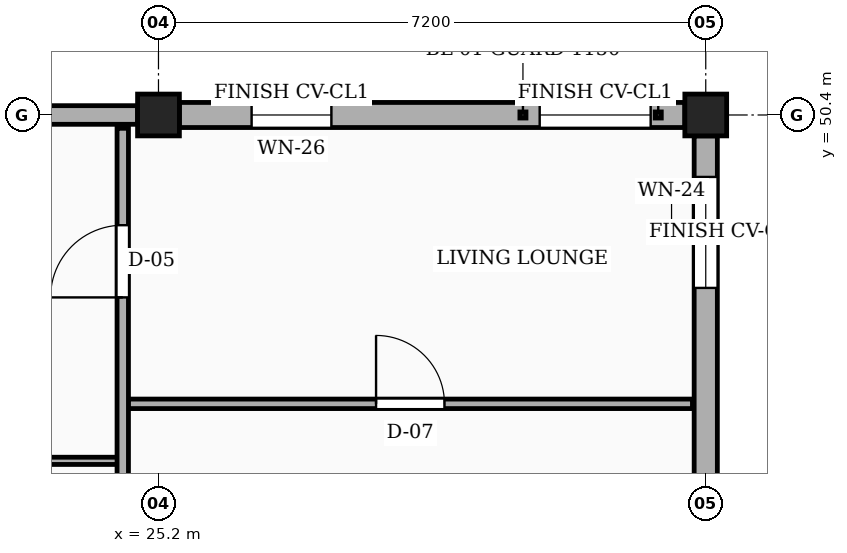
"""IFC4 building model, lengths in metres.
Left out: names, types, materials, properties, quantities, classifications, styles, units other than length and angle.
Written with IfcOpenShell. Run it as: python <this file> out.ifc"""

import sys

from ifc_helpers import new_model, si_unit, direction, frame, frame_2d, origin, origin_2d, place, context, subcontext, project, spatial, rectangle, extrude, element, fill, save


model = new_model("IFC4")
c1 = context("Model", 3, precision=1e-05, world=origin(), true_north=direction((0.0, 1.0)))
c2 = subcontext(c1, "Body", "Model", "MODEL_VIEW")
j1 = project(units=[si_unit("LENGTHUNIT", "METRE"), si_unit("PLANEANGLEUNIT", "RADIAN")], contexts=[c1])
p1 = place(None, origin())
s1 = spatial("IfcSite", under=j1, at=p1, CompositionType="ELEMENT")
p2 = place(p1, origin())
s2 = spatial("IfcBuilding", under=s1, at=p2, CompositionType="ELEMENT")
p3 = place(p2, frame((0.0, 0.0, 13.95)))
s3 = spatial("IfcBuildingStorey", under=s2, at=p3, CompositionType="ELEMENT", Elevation=13.95)
for number, where, z_axis, x_axis in (
    (1, (25.2, 50.4, 0.0), (0.0, 0.0, 1.0), (1.0, 0.0, 0.0)),
    (2, (32.4, 50.4, 0.0), (0.0, 0.0, 1.0), (1.0, 0.0, 0.0)),
):
    element("IfcColumn", number, at=place(p3, frame(where, z_axis=z_axis, x_axis=x_axis)), inside=s3, PredefinedType="COLUMN", context=c2, shape_type="SweptSolid", body=[
        extrude(rectangle(XDim=0.55, YDim=0.55, at=origin_2d()), origin(), (0.0, 0.0, 1.0), 3.15),
    ])
p4 = place(p3, frame((32.4, 43.475, 0.0), z_axis=(0.0, 0.0, 1.0), x_axis=(0.0, 1.0, 0.0)))
e3 = element("IfcWall", 3, at=p4, inside=s3, PredefinedType="SOLIDWALL", context=c2, shape_type="SweptSolid", body=[
    extrude(rectangle(XDim=6.65, YDim=0.305, at=frame_2d((3.325, 0.0))), origin(), (0.0, 0.0, 1.0), 2.44),
])
p5 = place(p4, frame((0.45, 0.0, 0.78)))
e4 = element("IfcOpeningElement", 4, at=p5, cuts=e3, PredefinedType="OPENING", context=c2, shape_type="SweptSolid", body=[
    extrude(rectangle(XDim=1.3, YDim=1.36, at=frame_2d((0.65, 0.68))), frame((0.0, 0.163, 0.0), z_axis=(0.0, -1.0, 0.0), x_axis=(1.0, 0.0, 0.0)), (0.0, 0.0, 1.0), 0.325),
])
p6 = place(p4, frame((4.65, 0.0, 0.78)))
e5 = element("IfcOpeningElement", 5, at=p6, cuts=e3, PredefinedType="OPENING", context=c2, shape_type="SweptSolid", body=[
    extrude(rectangle(XDim=1.46, YDim=1.36, at=frame_2d((0.73, 0.68))), frame((0.0, 0.163, 0.0), z_axis=(0.0, -1.0, 0.0), x_axis=(1.0, 0.0, 0.0)), (0.0, 0.0, 1.0), 0.325),
])
p7 = place(p3, frame((32.125, 50.4, 0.0), z_axis=(0.0, 0.0, 1.0), x_axis=(-1.0, 0.0, 0.0)))
e6 = element("IfcWall", 6, at=p7, inside=s3, PredefinedType="SOLIDWALL", context=c2, shape_type="SweptSolid", body=[
    extrude(rectangle(XDim=6.65, YDim=0.33, at=frame_2d((3.325, 0.0))), origin(), (0.0, 0.0, 1.0), 2.44),
])
p8 = place(p7, frame((0.45, 0.0, 0.78)))
e7 = element("IfcOpeningElement", 7, at=p8, cuts=e6, PredefinedType="OPENING", context=c2, shape_type="SweptSolid", body=[
    extrude(rectangle(XDim=1.46, YDim=1.36, at=frame_2d((0.73, 0.68))), frame((0.0, 0.175, 0.0), z_axis=(0.0, -1.0, 0.0), x_axis=(1.0, 0.0, 0.0)), (0.0, 0.0, 1.0), 0.35),
])
p9 = place(p7, frame((4.65, 0.0, 0.78)))
e8 = element("IfcOpeningElement", 8, at=p9, cuts=e6, PredefinedType="OPENING", context=c2, shape_type="SweptSolid", body=[
    extrude(rectangle(XDim=1.05, YDim=1.44, at=frame_2d((0.525, 0.72))), frame((0.0, 0.175, 0.0), z_axis=(0.0, -1.0, 0.0), x_axis=(1.0, 0.0, 0.0)), (0.0, 0.0, 1.0), 0.35),
])
p10 = place(p3, frame((24.925, 50.4, 0.0), z_axis=(0.0, 0.0, 1.0), x_axis=(-1.0, 0.0, 0.0)))
e9 = element("IfcWall", 9, at=p10, inside=s3, PredefinedType="SOLIDWALL", context=c2, shape_type="SweptSolid", body=[
    extrude(rectangle(XDim=6.65, YDim=0.245, at=frame_2d((3.325, 0.0))), origin(), (0.0, 0.0, 1.0), 2.44),
])
p11 = place(p10, frame((1.985, 0.0, 0.78)))
e10 = element("IfcOpeningElement", 10, at=p11, cuts=e9, PredefinedType="OPENING", context=c2, shape_type="SweptSolid", body=[
    extrude(rectangle(XDim=1.05, YDim=1.44, at=frame_2d((0.525, 0.72))), frame((0.0, 0.133, 0.0), z_axis=(0.0, -1.0, 0.0), x_axis=(1.0, 0.0, 0.0)), (0.0, 0.0, 1.0), 0.265),
])
p12 = place(p10, frame((5.147, 0.0, 0.78)))
e11 = element("IfcOpeningElement", 11, at=p12, cuts=e9, PredefinedType="OPENING", context=c2, shape_type="SweptSolid", body=[
    extrude(rectangle(XDim=1.04, YDim=1.26, at=frame_2d((0.52, 0.63))), frame((0.0, 0.133, 0.0), z_axis=(0.0, -1.0, 0.0), x_axis=(1.0, 0.0, 0.0)), (0.0, 0.0, 1.0), 0.265),
])
p13 = place(p3, frame((24.8, 46.6, 0.0), z_axis=(0.0, 0.0, 1.0), x_axis=(1.0, 0.0, 0.0)))
e12 = element("IfcWall", 12, at=p13, inside=s3, PredefinedType="PARTITIONING", context=c2, shape_type="SweptSolid", body=[
    extrude(rectangle(XDim=7.425, YDim=0.125, at=frame_2d((3.712, 0.0))), origin(), (0.0, 0.0, 1.0), 2.305),
])
p14 = place(p13, frame((3.262, 0.0, 0.0)))
e13 = element("IfcOpeningElement", 13, at=p14, cuts=e12, PredefinedType="OPENING", context=c2, shape_type="SweptSolid", body=[
    extrude(rectangle(XDim=0.9, YDim=2.1, at=frame_2d((0.45, 1.05))), frame((0.0, 0.073, 0.0), z_axis=(0.0, -1.0, 0.0), x_axis=(1.0, 0.0, 0.0)), (0.0, 0.0, 1.0), 0.145),
])
p15 = place(p3, frame((20.19, 45.85, 0.0), z_axis=(0.0, 0.0, 1.0), x_axis=(1.0, 0.0, 0.0)))
e14 = element("IfcWall", 14, at=p15, inside=s3, PredefinedType="PARTITIONING", context=c2, shape_type="SweptSolid", body=[
    extrude(rectangle(XDim=4.47, YDim=0.095, at=frame_2d((2.235, 0.0))), origin(), (0.0, 0.0, 1.0), 2.305),
])
p16 = place(p15, frame((1.785, 0.0, 0.0)))
e15 = element("IfcOpeningElement", 15, at=p16, cuts=e14, PredefinedType="OPENING", context=c2, shape_type="SweptSolid", body=[
    extrude(rectangle(XDim=0.9, YDim=2.05, at=frame_2d((0.45, 1.025))), frame((0.0, 0.058, 0.0), z_axis=(0.0, -1.0, 0.0), x_axis=(1.0, 0.0, 0.0)), (0.0, 0.0, 1.0), 0.115),
])
p17 = place(p3, frame((24.73, 43.34, 0.0), z_axis=(0.0, 0.0, 1.0), x_axis=(0.0, 1.0, 0.0)))
e16 = element("IfcWall", 16, at=p17, inside=s3, PredefinedType="PARTITIONING", context=c2, shape_type="SweptSolid", body=[
    extrude(rectangle(XDim=6.885, YDim=0.15, at=frame_2d((3.442, 0.0))), origin(), (0.0, 0.0, 1.0), 2.305),
])
p18 = place(p17, frame((4.66, 0.0, 0.0)))
e17 = element("IfcOpeningElement", 17, at=p18, cuts=e16, PredefinedType="OPENING", context=c2, shape_type="SweptSolid", body=[
    extrude(rectangle(XDim=0.95, YDim=2.1, at=frame_2d((0.475, 1.05))), frame((0.0, 0.085, 0.0), z_axis=(0.0, -1.0, 0.0), x_axis=(1.0, 0.0, 0.0)), (0.0, 0.0, 1.0), 0.17),
])
p19 = place(p6, origin())
e18 = element("IfcWindow", 18, at=p19, inside=s3, PartitioningType="SINGLE_PANEL", PredefinedType="WINDOW", context=c2, shape_type="SweptSolid", body=[
    extrude(rectangle(XDim=1.46, YDim=1.36, at=frame_2d((0.73, 0.68))), frame((0.0, 0.03, 0.0), z_axis=(0.0, -1.0, 0.0), x_axis=(1.0, 0.0, 0.0)), (0.0, 0.0, 1.0), 0.06),
])
fill(e5, e18)
p20 = place(p8, origin())
e19 = element("IfcWindow", 19, at=p20, inside=s3, PartitioningType="SINGLE_PANEL", PredefinedType="WINDOW", context=c2, shape_type="SweptSolid", body=[
    extrude(rectangle(XDim=1.46, YDim=1.36, at=frame_2d((0.73, 0.68))), frame((0.0, 0.03, 0.0), z_axis=(0.0, -1.0, 0.0), x_axis=(1.0, 0.0, 0.0)), (0.0, 0.0, 1.0), 0.06),
])
fill(e7, e19)
p21 = place(p9, origin())
e20 = element("IfcWindow", 20, at=p21, inside=s3, PartitioningType="SINGLE_PANEL", PredefinedType="WINDOW", context=c2, shape_type="SweptSolid", body=[
    extrude(rectangle(XDim=1.05, YDim=1.44, at=frame_2d((0.525, 0.72))), frame((0.0, 0.03, 0.0), z_axis=(0.0, -1.0, 0.0), x_axis=(1.0, 0.0, 0.0)), (0.0, 0.0, 1.0), 0.06),
])
fill(e8, e20)
p22 = place(p14, origin())
e21 = element("IfcDoor", 21, at=p22, inside=s3, OperationType="SINGLE_SWING_LEFT", PredefinedType="DOOR", context=c2, shape_type="SweptSolid", body=[
    extrude(rectangle(XDim=0.9, YDim=2.1, at=frame_2d((0.45, 1.05))), frame((0.0, 0.025, 0.0), z_axis=(0.0, -1.0, 0.0), x_axis=(1.0, 0.0, 0.0)), (0.0, 0.0, 1.0), 0.05),
])
fill(e13, e21)
p23 = place(p18, origin())
e22 = element("IfcDoor", 22, at=p23, inside=s3, OperationType="SINGLE_SWING_LEFT", PredefinedType="DOOR", context=c2, shape_type="SweptSolid", body=[
    extrude(rectangle(XDim=0.95, YDim=2.1, at=frame_2d((0.475, 1.05))), frame((0.0, 0.025, 0.0), z_axis=(0.0, -1.0, 0.0), x_axis=(1.0, 0.0, 0.0)), (0.0, 0.0, 1.0), 0.05),
])
fill(e17, e22)
save(model, sys.argv[1])
